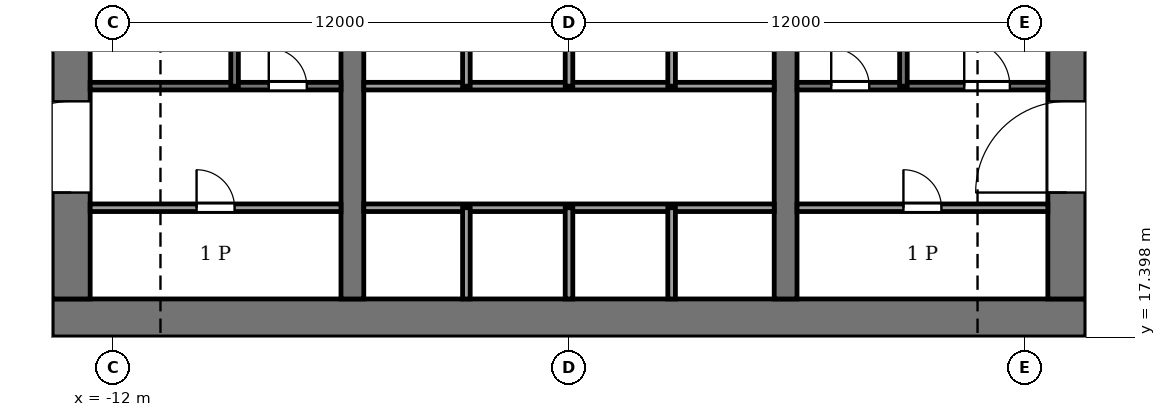
"""IFC4 building model, lengths in metres.
Left out: names, types, materials, properties, quantities, classifications, styles, units other than length and angle.
Written with IfcOpenShell. Run it as: python <this file> out.ifc"""

import sys

from ifc_helpers import new_model, si_unit, direction, frame, frame_2d, origin, place, context, subcontext, project, spatial, rectangle, extrude, element, fill, save


model = new_model("IFC4")
c1 = context("Model", 3, precision=1e-05, world=origin(), true_north=direction((0.0, 1.0)))
c2 = subcontext(c1, "Body", "Model", "MODEL_VIEW")
j1 = project(units=[si_unit("LENGTHUNIT", "METRE"), si_unit("PLANEANGLEUNIT", "RADIAN")], contexts=[c1])
p1 = place(None, origin())
s1 = spatial("IfcSite", under=j1, at=p1, CompositionType="ELEMENT")
p2 = place(p1, origin())
s2 = spatial("IfcBuilding", under=s1, at=p2, CompositionType="ELEMENT")
p3 = place(p2, frame((0.0, 0.0, 170.0)))
s3 = spatial("IfcBuildingStorey", under=s2, at=p3, CompositionType="ELEMENT", Elevation=170.0)
p4 = place(p3, frame((-13.6, 17.9, -0.25), z_axis=(0.0, 0.0, 1.0), x_axis=(1.0, 0.0, 0.0)))
e1 = element("IfcWall", 1, at=p4, inside=s3, PredefinedType="SHEAR", context=c2, shape_type="SweptSolid", body=[
    extrude(rectangle(XDim=27.2, YDim=1.0, at=frame_2d((13.6, 0.0))), origin(), (0.0, 0.0, 1.0), 7.12),
])
p5 = place(p3, frame((-13.1, 18.4, -0.25), z_axis=(0.0, 0.0, 1.0), x_axis=(0.0, 1.0, 0.0)))
e2 = element("IfcWall", 2, at=p5, inside=s3, PredefinedType="SHEAR", context=c2, shape_type="SweptSolid", body=[
    extrude(rectangle(XDim=19.2, YDim=1.0, at=frame_2d((9.6, 0.0))), origin(), (0.0, 0.0, 1.0), 7.12),
])
p6 = place(p5, frame((2.8, 0.0, 0.25)))
e3 = element("IfcOpeningElement", 3, at=p6, cuts=e2, PredefinedType="OPENING", context=c2, shape_type="SweptSolid", body=[
    extrude(rectangle(XDim=2.4, YDim=2.4, at=frame_2d((1.2, 1.2))), frame((0.0, 0.51, 0.0), z_axis=(0.0, -1.0, 0.0), x_axis=(1.0, 0.0, 0.0)), (0.0, 0.0, 1.0), 1.02),
])
p7 = place(p5, frame((13.4, 0.0, 0.25)))
e4 = element("IfcOpeningElement", 4, at=p7, cuts=e2, PredefinedType="OPENING", context=c2, shape_type="SweptSolid", body=[
    extrude(rectangle(XDim=1.4, YDim=2.2, at=frame_2d((0.7, 1.1))), frame((0.0, 0.51, 0.0), z_axis=(0.0, -1.0, 0.0), x_axis=(1.0, 0.0, 0.0)), (0.0, 0.0, 1.0), 1.02),
])
p8 = place(p3, frame((13.1, 18.4, -0.25), z_axis=(0.0, 0.0, 1.0), x_axis=(0.0, 1.0, 0.0)))
e5 = element("IfcWall", 5, at=p8, inside=s3, PredefinedType="SHEAR", context=c2, shape_type="SweptSolid", body=[
    extrude(rectangle(XDim=19.2, YDim=1.0, at=frame_2d((9.6, 0.0))), origin(), (0.0, 0.0, 1.0), 7.12),
])
p9 = place(p8, frame((2.8, 0.0, 0.25)))
e6 = element("IfcOpeningElement", 6, at=p9, cuts=e5, PredefinedType="OPENING", context=c2, shape_type="SweptSolid", body=[
    extrude(rectangle(XDim=2.4, YDim=2.4, at=frame_2d((1.2, 1.2))), frame((0.0, 0.51, 0.0), z_axis=(0.0, -1.0, 0.0), x_axis=(1.0, 0.0, 0.0)), (0.0, 0.0, 1.0), 1.02),
])
p10 = place(p8, frame((13.3, 0.0, 0.25)))
e7 = element("IfcOpeningElement", 7, at=p10, cuts=e5, PredefinedType="OPENING", context=c2, shape_type="SweptSolid", body=[
    extrude(rectangle(XDim=2.4, YDim=2.4, at=frame_2d((1.2, 1.2))), frame((0.0, 0.51, 0.0), z_axis=(0.0, -1.0, 0.0), x_axis=(1.0, 0.0, 0.0)), (0.0, 0.0, 1.0), 1.02),
])
p11 = place(p3, frame((-5.7, 18.4, -0.25), z_axis=(0.0, 0.0, 1.0), x_axis=(0.0, 1.0, 0.0)))
e8 = element("IfcWall", 8, at=p11, inside=s3, PredefinedType="SHEAR", context=c2, shape_type="SweptSolid", body=[
    extrude(rectangle(XDim=19.2, YDim=0.6, at=frame_2d((9.6, 0.0))), origin(), (0.0, 0.0, 1.0), 7.12),
])
p12 = place(p11, frame((8.35, 0.0, 0.25)))
e9 = element("IfcOpeningElement", 9, at=p12, cuts=e8, PredefinedType="OPENING", context=c2, shape_type="SweptSolid", body=[
    extrude(rectangle(XDim=0.9, YDim=2.1, at=frame_2d((0.45, 1.05))), frame((0.0, 0.31, 0.0), z_axis=(0.0, -1.0, 0.0), x_axis=(1.0, 0.0, 0.0)), (0.0, 0.0, 1.0), 0.62),
])
p13 = place(p3, frame((5.7, 18.4, -0.25), z_axis=(0.0, 0.0, 1.0), x_axis=(0.0, 1.0, 0.0)))
e10 = element("IfcWall", 10, at=p13, inside=s3, PredefinedType="SHEAR", context=c2, shape_type="SweptSolid", body=[
    extrude(rectangle(XDim=19.2, YDim=0.6, at=frame_2d((9.6, 0.0))), origin(), (0.0, 0.0, 1.0), 7.12),
])
p14 = place(p13, frame((13.3, 0.0, 0.25)))
e11 = element("IfcOpeningElement", 11, at=p14, cuts=e10, PredefinedType="OPENING", context=c2, shape_type="SweptSolid", body=[
    extrude(rectangle(XDim=2.4, YDim=2.4, at=frame_2d((1.2, 1.2))), frame((0.0, 0.31, 0.0), z_axis=(0.0, -1.0, 0.0), x_axis=(1.0, 0.0, 0.0)), (0.0, 0.0, 1.0), 0.62),
])
p15 = place(p3, frame((-12.6, 20.8, 0.0), z_axis=(0.0, 0.0, 1.0), x_axis=(1.0, 0.0, 0.0)))
e12 = element("IfcWall", 12, at=p15, inside=s3, PredefinedType="PARTITIONING", context=c2, shape_type="SweptSolid", body=[
    extrude(rectangle(XDim=6.6, YDim=0.2, at=frame_2d((3.3, 0.0))), origin(), (0.0, 0.0, 1.0), 6.87),
])
p16 = place(p15, frame((2.8, 0.0, 0.0)))
e13 = element("IfcOpeningElement", 13, at=p16, cuts=e12, PredefinedType="OPENING", context=c2, shape_type="SweptSolid", body=[
    extrude(rectangle(XDim=1.0, YDim=2.1, at=frame_2d((0.5, 1.05))), frame((0.0, 0.11, 0.0), z_axis=(0.0, -1.0, 0.0), x_axis=(1.0, 0.0, 0.0)), (0.0, 0.0, 1.0), 0.22),
])
p17 = place(p3, frame((-5.4, 20.8, 0.0), z_axis=(0.0, 0.0, 1.0), x_axis=(1.0, 0.0, 0.0)))
e14 = element("IfcWall", 14, at=p17, inside=s3, PredefinedType="PARTITIONING", context=c2, shape_type="SweptSolid", body=[
    extrude(rectangle(XDim=10.8, YDim=0.2, at=frame_2d((5.4, 0.0))), origin(), (0.0, 0.0, 1.0), 6.87),
])
p18 = place(p3, frame((6.0, 20.8, 0.0), z_axis=(0.0, 0.0, 1.0), x_axis=(1.0, 0.0, 0.0)))
e15 = element("IfcWall", 15, at=p18, inside=s3, PredefinedType="PARTITIONING", context=c2, shape_type="SweptSolid", body=[
    extrude(rectangle(XDim=6.6, YDim=0.2, at=frame_2d((3.3, 0.0))), origin(), (0.0, 0.0, 1.0), 6.87),
])
p19 = place(p18, frame((2.8, 0.0, 0.0)))
e16 = element("IfcOpeningElement", 16, at=p19, cuts=e15, PredefinedType="OPENING", context=c2, shape_type="SweptSolid", body=[
    extrude(rectangle(XDim=1.0, YDim=2.1, at=frame_2d((0.5, 1.05))), frame((0.0, 0.11, 0.0), z_axis=(0.0, -1.0, 0.0), x_axis=(1.0, 0.0, 0.0)), (0.0, 0.0, 1.0), 0.22),
])
p20 = place(p3, frame((-12.6, 24.0, 0.0), z_axis=(0.0, 0.0, 1.0), x_axis=(1.0, 0.0, 0.0)))
e17 = element("IfcWall", 17, at=p20, inside=s3, PredefinedType="PARTITIONING", context=c2, shape_type="SweptSolid", body=[
    extrude(rectangle(XDim=6.6, YDim=0.2, at=frame_2d((3.3, 0.0))), origin(), (0.0, 0.0, 1.0), 6.87),
])
p21 = place(p20, frame((4.7, 0.0, 0.0)))
e18 = element("IfcOpeningElement", 18, at=p21, cuts=e17, PredefinedType="OPENING", context=c2, shape_type="SweptSolid", body=[
    extrude(rectangle(XDim=1.0, YDim=2.1, at=frame_2d((0.5, 1.05))), frame((0.0, 0.11, 0.0), z_axis=(0.0, -1.0, 0.0), x_axis=(1.0, 0.0, 0.0)), (0.0, 0.0, 1.0), 0.22),
])
p22 = place(p3, frame((-5.4, 24.0, 0.0), z_axis=(0.0, 0.0, 1.0), x_axis=(1.0, 0.0, 0.0)))
e19 = element("IfcWall", 19, at=p22, inside=s3, PredefinedType="PARTITIONING", context=c2, shape_type="SweptSolid", body=[
    extrude(rectangle(XDim=10.8, YDim=0.2, at=frame_2d((5.4, 0.0))), origin(), (0.0, 0.0, 1.0), 6.87),
])
p23 = place(p3, frame((6.0, 24.0, 0.0), z_axis=(0.0, 0.0, 1.0), x_axis=(1.0, 0.0, 0.0)))
e20 = element("IfcWall", 20, at=p23, inside=s3, PredefinedType="PARTITIONING", context=c2, shape_type="SweptSolid", body=[
    extrude(rectangle(XDim=6.6, YDim=0.2, at=frame_2d((3.3, 0.0))), origin(), (0.0, 0.0, 1.0), 6.87),
])
p24 = place(p23, frame((0.9, 0.0, 0.0)))
e21 = element("IfcOpeningElement", 21, at=p24, cuts=e20, PredefinedType="OPENING", context=c2, shape_type="SweptSolid", body=[
    extrude(rectangle(XDim=1.0, YDim=2.1, at=frame_2d((0.5, 1.05))), frame((0.0, 0.11, 0.0), z_axis=(0.0, -1.0, 0.0), x_axis=(1.0, 0.0, 0.0)), (0.0, 0.0, 1.0), 0.22),
])
p25 = place(p23, frame((4.4, 0.0, 0.0)))
e22 = element("IfcOpeningElement", 22, at=p25, cuts=e20, PredefinedType="OPENING", context=c2, shape_type="SweptSolid", body=[
    extrude(rectangle(XDim=1.2, YDim=2.2, at=frame_2d((0.6, 1.1))), frame((0.0, 0.11, 0.0), z_axis=(0.0, -1.0, 0.0), x_axis=(1.0, 0.0, 0.0)), (0.0, 0.0, 1.0), 0.22),
])
p26 = place(p3, frame((-8.8, 24.0, 0.0), z_axis=(0.0, 0.0, 1.0), x_axis=(0.0, 1.0, 0.0)))
e23 = element("IfcWall", 23, at=p26, inside=s3, PredefinedType="PARTITIONING", context=c2, shape_type="SweptSolid", body=[
    extrude(rectangle(XDim=7.4, YDim=0.2, at=frame_2d((3.7, 0.0))), origin(), (0.0, 0.0, 1.0), 6.87),
])
p27 = place(p3, frame((-2.7, 18.4, 0.0), z_axis=(0.0, 0.0, 1.0), x_axis=(0.0, 1.0, 0.0)))
e24 = element("IfcWall", 24, at=p27, inside=s3, PredefinedType="PARTITIONING", context=c2, shape_type="SweptSolid", body=[
    extrude(rectangle(XDim=2.4, YDim=0.2, at=frame_2d((1.2, 0.0))), origin(), (0.0, 0.0, 1.0), 6.87),
])
p28 = place(p3, frame((-2.7, 24.0, 0.0), z_axis=(0.0, 0.0, 1.0), x_axis=(0.0, 1.0, 0.0)))
e25 = element("IfcWall", 25, at=p28, inside=s3, PredefinedType="PARTITIONING", context=c2, shape_type="SweptSolid", body=[
    extrude(rectangle(XDim=2.4, YDim=0.2, at=frame_2d((1.2, 0.0))), origin(), (0.0, 0.0, 1.0), 6.87),
])
p29 = place(p3, frame((0.0, 18.4, 0.0), z_axis=(0.0, 0.0, 1.0), x_axis=(0.0, 1.0, 0.0)))
e26 = element("IfcWall", 26, at=p29, inside=s3, PredefinedType="PARTITIONING", context=c2, shape_type="SweptSolid", body=[
    extrude(rectangle(XDim=2.4, YDim=0.2, at=frame_2d((1.2, 0.0))), origin(), (0.0, 0.0, 1.0), 6.87),
])
p30 = place(p3, frame((0.0, 24.0, 0.0), z_axis=(0.0, 0.0, 1.0), x_axis=(0.0, 1.0, 0.0)))
e27 = element("IfcWall", 27, at=p30, inside=s3, PredefinedType="PARTITIONING", context=c2, shape_type="SweptSolid", body=[
    extrude(rectangle(XDim=2.4, YDim=0.2, at=frame_2d((1.2, 0.0))), origin(), (0.0, 0.0, 1.0), 6.87),
])
p31 = place(p3, frame((2.7, 18.4, 0.0), z_axis=(0.0, 0.0, 1.0), x_axis=(0.0, 1.0, 0.0)))
e28 = element("IfcWall", 28, at=p31, inside=s3, PredefinedType="PARTITIONING", context=c2, shape_type="SweptSolid", body=[
    extrude(rectangle(XDim=2.4, YDim=0.2, at=frame_2d((1.2, 0.0))), origin(), (0.0, 0.0, 1.0), 6.87),
])
p32 = place(p3, frame((2.7, 24.0, 0.0), z_axis=(0.0, 0.0, 1.0), x_axis=(0.0, 1.0, 0.0)))
e29 = element("IfcWall", 29, at=p32, inside=s3, PredefinedType="PARTITIONING", context=c2, shape_type="SweptSolid", body=[
    extrude(rectangle(XDim=2.4, YDim=0.2, at=frame_2d((1.2, 0.0))), origin(), (0.0, 0.0, 1.0), 6.87),
])
p33 = place(p3, frame((8.8, 24.0, 0.0), z_axis=(0.0, 0.0, 1.0), x_axis=(0.0, 1.0, 0.0)))
e30 = element("IfcWall", 30, at=p33, inside=s3, PredefinedType="PARTITIONING", context=c2, shape_type="SweptSolid", body=[
    extrude(rectangle(XDim=7.4, YDim=0.2, at=frame_2d((3.7, 0.0))), origin(), (0.0, 0.0, 1.0), 6.87),
])
p34 = place(p16, origin())
e31 = element("IfcDoor", 31, at=p34, inside=s3, OperationType="SINGLE_SWING_LEFT", PredefinedType="DOOR", context=c2, shape_type="SweptSolid", body=[
    extrude(rectangle(XDim=1.0, YDim=2.1, at=frame_2d((0.5, 1.05))), frame((0.0, 0.025, 0.0), z_axis=(0.0, -1.0, 0.0), x_axis=(1.0, 0.0, 0.0)), (0.0, 0.0, 1.0), 0.05),
])
fill(e13, e31)
p35 = place(p19, origin())
e32 = element("IfcDoor", 32, at=p35, inside=s3, OperationType="SINGLE_SWING_RIGHT", PredefinedType="DOOR", context=c2, shape_type="SweptSolid", body=[
    extrude(rectangle(XDim=1.0, YDim=2.1, at=frame_2d((0.5, 1.05))), frame((0.0, 0.025, 0.0), z_axis=(0.0, -1.0, 0.0), x_axis=(1.0, 0.0, 0.0)), (0.0, 0.0, 1.0), 0.05),
])
fill(e16, e32)
p36 = place(p21, origin())
e33 = element("IfcDoor", 33, at=p36, inside=s3, OperationType="SINGLE_SWING_RIGHT", PredefinedType="DOOR", context=c2, shape_type="SweptSolid", body=[
    extrude(rectangle(XDim=1.0, YDim=2.1, at=frame_2d((0.5, 1.05))), frame((0.0, 0.025, 0.0), z_axis=(0.0, -1.0, 0.0), x_axis=(1.0, 0.0, 0.0)), (0.0, 0.0, 1.0), 0.05),
])
fill(e18, e33)
p37 = place(p24, origin())
e34 = element("IfcDoor", 34, at=p37, inside=s3, OperationType="SINGLE_SWING_LEFT", PredefinedType="DOOR", context=c2, shape_type="SweptSolid", body=[
    extrude(rectangle(XDim=1.0, YDim=2.1, at=frame_2d((0.5, 1.05))), frame((0.0, 0.025, 0.0), z_axis=(0.0, -1.0, 0.0), x_axis=(1.0, 0.0, 0.0)), (0.0, 0.0, 1.0), 0.05),
])
fill(e21, e34)
p38 = place(p25, origin())
e35 = element("IfcDoor", 35, at=p38, inside=s3, OperationType="SINGLE_SWING_LEFT", PredefinedType="DOOR", context=c2, shape_type="SweptSolid", body=[
    extrude(rectangle(XDim=1.2, YDim=2.2, at=frame_2d((0.6, 1.1))), frame((0.0, 0.025, 0.0), z_axis=(0.0, -1.0, 0.0), x_axis=(1.0, 0.0, 0.0)), (0.0, 0.0, 1.0), 0.05),
])
fill(e22, e35)
p39 = place(p6, origin())
e36 = element("IfcDoor", 36, at=p39, inside=s3, OperationType="DOUBLE_DOOR_SINGLE_SWING", PredefinedType="DOOR", context=c2, shape_type="SweptSolid", body=[
    extrude(rectangle(XDim=2.4, YDim=2.4, at=frame_2d((1.2, 1.2))), frame((0.0, 0.025, 0.0), z_axis=(0.0, -1.0, 0.0), x_axis=(1.0, 0.0, 0.0)), (0.0, 0.0, 1.0), 0.05),
])
fill(e3, e36)
p40 = place(p9, origin())
e37 = element("IfcDoor", 37, at=p40, inside=s3, OperationType="DOUBLE_DOOR_SINGLE_SWING", PredefinedType="DOOR", context=c2, shape_type="SweptSolid", body=[
    extrude(rectangle(XDim=2.4, YDim=2.4, at=frame_2d((1.2, 1.2))), frame((0.0, 0.025, 0.0), z_axis=(0.0, -1.0, 0.0), x_axis=(1.0, 0.0, 0.0)), (0.0, 0.0, 1.0), 0.05),
])
fill(e6, e37)
save(model, sys.argv[1])
